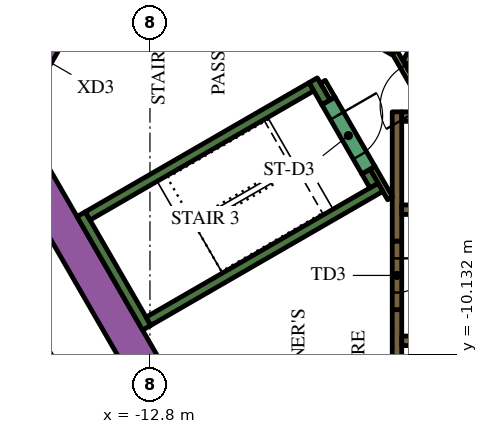
"""IFC4 building model, lengths in metres.
Left out: names, types, materials, properties, quantities, classifications, styles, units other than length and angle.
Written with IfcOpenShell. Run it as: python <this file> out.ifc"""

import sys

from ifc_helpers import new_model, si_unit, direction, frame, frame_2d, origin, place, context, subcontext, project, spatial, rectangle, extrude, element, fill, save


model = new_model("IFC4")
c1 = context("Model", 3, precision=1e-05, world=origin(), true_north=direction((0.0, 1.0)))
c2 = subcontext(c1, "Body", "Model", "MODEL_VIEW")
j1 = project(units=[si_unit("LENGTHUNIT", "METRE"), si_unit("PLANEANGLEUNIT", "RADIAN")], contexts=[c1])
p1 = place(None, origin())
s1 = spatial("IfcSite", under=j1, at=p1, CompositionType="ELEMENT")
p2 = place(p1, origin())
s2 = spatial("IfcBuilding", under=s1, at=p2, CompositionType="ELEMENT")
p3 = place(p2, frame((0.0, 0.0, 47.1)))
s3 = spatial("IfcBuildingStorey", under=s2, at=p3, CompositionType="ELEMENT", Elevation=47.1)
p4 = place(p3, frame((-12.134, -11.883, 0.0), z_axis=(0.0, 0.0, 1.0), x_axis=(-0.500005339912, 0.866022320763, 0.0)))
e1 = element("IfcWall", 1, at=p4, inside=s3, PredefinedType="SOLIDWALL", context=c2, shape_type="SweptSolid", body=[
    extrude(rectangle(XDim=9.488, YDim=0.9, at=frame_2d((4.744, 0.0))), origin(), (0.0, 0.0, 1.0), 3.9),
])
p5 = place(p3, frame((-12.885, -9.431, 0.0), z_axis=(0.0, 0.0, 1.0), x_axis=(-0.500020560727, 0.866013532718, 0.0)))
e2 = element("IfcWall", 2, at=p5, inside=s3, PredefinedType="SOLIDWALL", context=c2, shape_type="SweptSolid", body=[
    extrude(rectangle(XDim=3.45, YDim=0.25, at=frame_2d((1.725, 0.0))), origin(), (0.0, 0.0, 1.0), 3.9),
])
p6 = place(p3, frame((-14.44, -6.49, 0.0), z_axis=(0.0, 0.0, 1.0), x_axis=(0.866022966069, 0.500004222222, 0.0)))
e3 = element("IfcWall", 3, at=p6, inside=s3, PredefinedType="SOLIDWALL", context=c2, shape_type="SweptSolid", body=[
    extrude(rectangle(XDim=6.8, YDim=0.25, at=frame_2d((3.4, 0.0))), origin(), (0.0, 0.0, 1.0), 3.9),
])
p7 = place(p3, frame((-8.168, -3.503, 0.0), z_axis=(0.0, 0.0, 1.0), x_axis=(-0.499952099219, 0.866053057547, 0.0)))
e4 = element("IfcWall", 4, at=p7, inside=s3, PredefinedType="SOLIDWALL", context=c2, shape_type="SweptSolid", body=[
    extrude(rectangle(XDim=0.675, YDim=0.25, at=frame_2d((0.337, 0.0))), origin(), (0.0, 0.0, 1.0), 3.9),
])
p8 = place(p3, frame((-12.84, -9.261, 0.0), z_axis=(0.0, 0.0, 1.0), x_axis=(0.866016039709, 0.500016218704, 0.0)))
e5 = element("IfcWall", 5, at=p8, inside=s3, PredefinedType="SOLIDWALL", context=c2, shape_type="SweptSolid", body=[
    extrude(rectangle(XDim=7.05, YDim=0.25, at=frame_2d((3.525, 0.0))), origin(), (0.0, 0.0, 1.0), 3.9),
])
p9 = place(p3, frame((-6.905, -5.69, 0.0), z_axis=(0.0, 0.0, 1.0), x_axis=(-0.500402024738, 0.865793170242, 0.0)))
e6 = element("IfcWall", 6, at=p9, inside=s3, PredefinedType="SOLIDWALL", context=c2, shape_type="SweptSolid", body=[
    extrude(rectangle(XDim=0.425, YDim=0.25, at=frame_2d((0.212, 0.0))), origin(), (0.0, 0.0, 1.0), 3.9),
])
p10 = place(p3, frame((-6.3, -12.1, 0.0), z_axis=(0.0, 0.0, 1.0), x_axis=(0.0, 1.0, 0.0)))
e7 = element("IfcWall", 7, at=p10, inside=s3, PredefinedType="SOLIDWALL", context=c2, shape_type="SweptSolid", body=[
    extrude(rectangle(XDim=3.146, YDim=0.25, at=frame_2d((1.573, 0.0))), origin(), (0.0, 0.0, 1.0), 3.9),
])
p11 = place(p3, frame((-6.3, -3.75, 0.0), z_axis=(0.0, 0.0, 1.0), x_axis=(0.0, -1.0, 0.0)))
e8 = element("IfcWall", 8, at=p11, inside=s3, PredefinedType="SOLIDWALL", context=c2, shape_type="SweptSolid", body=[
    extrude(rectangle(XDim=3.404, YDim=0.25, at=frame_2d((1.702, 0.0))), origin(), (0.0, 0.0, 1.0), 3.9),
])
p12 = place(p3, frame((-6.175, -3.875, 0.0), z_axis=(0.0, 0.0, 1.0), x_axis=(1.0, 0.0, 0.0)))
e9 = element("IfcWall", 9, at=p12, inside=s3, PredefinedType="SOLIDWALL", context=c2, shape_type="SweptSolid", body=[
    extrude(rectangle(XDim=0.637, YDim=0.25, at=frame_2d((0.318, 0.0))), origin(), (0.0, 0.0, 1.0), 3.9),
])
p13 = place(p3, frame((-6.088, -2.305, 0.0), z_axis=(0.0, 0.0, 1.0), x_axis=(0.866059450854, -0.499941024108, 0.0)))
e10 = element("IfcWall", 10, at=p13, inside=s3, PredefinedType="SOLIDWALL", context=c2, shape_type="SweptSolid", body=[
    extrude(rectangle(XDim=0.29, YDim=0.25, at=frame_2d((0.145, 0.0))), origin(), (0.0, 0.0, 1.0), 3.9),
])
p14 = place(p3, frame((-7.889, -1.265, 0.0), z_axis=(0.0, 0.0, 1.0), x_axis=(0.865986741702, -0.500066958712, 0.0)))
e11 = element("IfcWall", 11, at=p14, inside=s3, PredefinedType="SOLIDWALL", context=c2, shape_type="SweptSolid", body=[
    extrude(rectangle(XDim=1.738, YDim=0.25, at=frame_2d((0.869, 0.0))), origin(), (0.0, 0.0, 1.0), 3.9),
])
p15 = place(p3, frame((-6.48, -6.027, 0.0), z_axis=(0.0, 0.0, 1.0), x_axis=(-0.499927229454, 0.866067413802, 0.0)))
e12 = element("IfcWall", 12, at=p15, inside=s3, PredefinedType="PARTITIONING", context=c2, shape_type="SweptSolid", body=[
    extrude(rectangle(XDim=0.929, YDim=0.15, at=frame_2d((0.464, 0.0))), origin(), (0.0, 0.0, 1.0), 3.9),
])
p16 = place(p3, frame((-8.252, -2.958, 0.0), z_axis=(0.0, 0.0, 1.0), x_axis=(0.500174715838, -0.865924508047, 0.0)))
e13 = element("IfcWall", 13, at=p16, inside=s3, PredefinedType="PARTITIONING", context=c2, shape_type="SweptSolid", body=[
    extrude(rectangle(XDim=0.514, YDim=0.15, at=frame_2d((0.257, 0.0))), origin(), (0.0, 0.0, 1.0), 2.75),
])
p17 = place(p3, frame((-6.175, -9.775, 0.0), z_axis=(0.0, 0.0, 1.0), x_axis=(1.0, 0.0, 0.0)))
e14 = element("IfcWall", 14, at=p17, inside=s3, PredefinedType="SOLIDWALL", context=c2, shape_type="SweptSolid", body=[
    extrude(rectangle(XDim=12.35, YDim=0.25, at=frame_2d((6.175, 0.0))), origin(), (0.0, 0.0, 1.0), 3.9),
])
p18 = place(p17, frame((0.585, 0.0, 0.0)))
e15 = element("IfcOpeningElement", 15, at=p18, cuts=e14, PredefinedType="OPENING", context=c2, shape_type="SweptSolid", body=[
    extrude(rectangle(XDim=1.1, YDim=2.1, at=frame_2d((0.55, 1.05))), frame((0.0, 0.135, 0.0), z_axis=(0.0, -1.0, 0.0), x_axis=(1.0, 0.0, 0.0)), (0.0, 0.0, 1.0), 0.27),
])
p19 = place(p17, frame((3.105, 0.0, 0.0)))
e16 = element("IfcOpeningElement", 16, at=p19, cuts=e14, PredefinedType="OPENING", context=c2, shape_type="SweptSolid", body=[
    extrude(rectangle(XDim=1.1, YDim=2.1, at=frame_2d((0.55, 1.05))), frame((0.0, 0.135, 0.0), z_axis=(0.0, -1.0, 0.0), x_axis=(1.0, 0.0, 0.0)), (0.0, 0.0, 1.0), 0.27),
])
p20 = place(p17, frame((5.625, 0.0, 0.0)))
e17 = element("IfcOpeningElement", 17, at=p20, cuts=e14, PredefinedType="OPENING", context=c2, shape_type="SweptSolid", body=[
    extrude(rectangle(XDim=1.1, YDim=2.1, at=frame_2d((0.55, 1.05))), frame((0.0, 0.135, 0.0), z_axis=(0.0, -1.0, 0.0), x_axis=(1.0, 0.0, 0.0)), (0.0, 0.0, 1.0), 0.27),
])
p21 = place(p17, frame((8.145, 0.0, 0.0)))
e18 = element("IfcOpeningElement", 18, at=p21, cuts=e14, PredefinedType="OPENING", context=c2, shape_type="SweptSolid", body=[
    extrude(rectangle(XDim=1.1, YDim=2.1, at=frame_2d((0.55, 1.05))), frame((0.0, 0.135, 0.0), z_axis=(0.0, -1.0, 0.0), x_axis=(1.0, 0.0, 0.0)), (0.0, 0.0, 1.0), 0.27),
])
p22 = place(p17, frame((10.665, 0.0, 0.0)))
e19 = element("IfcOpeningElement", 19, at=p22, cuts=e14, PredefinedType="OPENING", context=c2, shape_type="SweptSolid", body=[
    extrude(rectangle(XDim=1.1, YDim=2.1, at=frame_2d((0.55, 1.05))), frame((0.0, 0.135, 0.0), z_axis=(0.0, -1.0, 0.0), x_axis=(1.0, 0.0, 0.0)), (0.0, 0.0, 1.0), 0.27),
])
p23 = place(p3, frame((-6.175, -6.325, 0.0), z_axis=(0.0, 0.0, 1.0), x_axis=(1.0, 0.0, 0.0)))
e20 = element("IfcWall", 20, at=p23, inside=s3, PredefinedType="SOLIDWALL", context=c2, shape_type="SweptSolid", body=[
    extrude(rectangle(XDim=12.35, YDim=0.25, at=frame_2d((6.175, 0.0))), origin(), (0.0, 0.0, 1.0), 3.9),
])
p24 = place(p23, frame((3.205, 0.0, 0.0)))
e21 = element("IfcOpeningElement", 21, at=p24, cuts=e20, PredefinedType="OPENING", context=c2, shape_type="SweptSolid", body=[
    extrude(rectangle(XDim=0.9, YDim=2.1, at=frame_2d((0.45, 1.05))), frame((0.0, 0.135, 0.0), z_axis=(0.0, -1.0, 0.0), x_axis=(1.0, 0.0, 0.0)), (0.0, 0.0, 1.0), 0.27),
])
p25 = place(p23, frame((8.145, 0.0, 0.0)))
e22 = element("IfcOpeningElement", 22, at=p25, cuts=e20, PredefinedType="OPENING", context=c2, shape_type="SweptSolid", body=[
    extrude(rectangle(XDim=1.1, YDim=2.1, at=frame_2d((0.55, 1.05))), frame((0.0, 0.135, 0.0), z_axis=(0.0, -1.0, 0.0), x_axis=(1.0, 0.0, 0.0)), (0.0, 0.0, 1.0), 0.27),
])
p26 = place(p23, frame((10.665, 0.0, 0.0)))
e23 = element("IfcOpeningElement", 23, at=p26, cuts=e20, PredefinedType="OPENING", context=c2, shape_type="SweptSolid", body=[
    extrude(rectangle(XDim=1.1, YDim=2.1, at=frame_2d((0.55, 1.05))), frame((0.0, 0.135, 0.0), z_axis=(0.0, -1.0, 0.0), x_axis=(1.0, 0.0, 0.0)), (0.0, 0.0, 1.0), 0.27),
])
p27 = place(p3, frame((-8.103, -3.466, 0.0), z_axis=(0.0, 0.0, 1.0), x_axis=(0.500078061341, -0.865980330357, 0.0)))
e24 = element("IfcWall", 24, at=p27, inside=s3, PredefinedType="SOLIDWALL", context=c2, shape_type="SweptSolid", body=[
    extrude(rectangle(XDim=2.1, YDim=0.4, at=frame_2d((1.05, 0.0))), origin(), (0.0, 0.0, 1.0), 3.9),
])
p28 = place(p27, frame((0.45, 0.0, 0.0)))
e25 = element("IfcOpeningElement", 25, at=p28, cuts=e24, PredefinedType="OPENING", context=c2, shape_type="SweptSolid", body=[
    extrude(rectangle(XDim=1.2, YDim=2.1, at=frame_2d((0.6, 1.05))), frame((0.0, 0.21, 0.0), z_axis=(0.0, -1.0, 0.0), x_axis=(1.0, 0.0, 0.0)), (0.0, 0.0, 1.0), 0.42),
])
p29 = place(p3, frame((-6.3, -7.154, 0.0), z_axis=(0.0, 0.0, 1.0), x_axis=(0.0, -1.0, 0.0)))
e26 = element("IfcWall", 26, at=p29, inside=s3, PredefinedType="SOLIDWALL", context=c2, shape_type="SweptSolid", body=[
    extrude(rectangle(XDim=1.8, YDim=0.25, at=frame_2d((0.9, 0.0))), origin(), (0.0, 0.0, 1.0), 3.9),
])
p30 = place(p29, frame((0.45, 0.0, 0.0)))
e27 = element("IfcOpeningElement", 27, at=p30, cuts=e26, PredefinedType="OPENING", context=c2, shape_type="SweptSolid", body=[
    extrude(rectangle(XDim=0.9, YDim=2.1, at=frame_2d((0.45, 1.05))), frame((0.0, 0.135, 0.0), z_axis=(0.0, -1.0, 0.0), x_axis=(1.0, 0.0, 0.0)), (0.0, 0.0, 1.0), 0.27),
])
p31 = place(p3, frame((-5.317, -3.99, 0.0), z_axis=(0.0, 0.0, 1.0), x_axis=(-0.500027713859, 0.866009402589, 0.0)))
e28 = element("IfcWall", 28, at=p31, inside=s3, PredefinedType="PARTITIONING", context=c2, shape_type="SweptSolid", body=[
    extrude(rectangle(XDim=2.1, YDim=0.15, at=frame_2d((1.05, 0.0))), origin(), (0.0, 0.0, 1.0), 3.9),
])
p32 = place(p31, frame((0.45, 0.0, 0.0)))
e29 = element("IfcOpeningElement", 29, at=p32, cuts=e28, PredefinedType="OPENING", context=c2, shape_type="SweptSolid", body=[
    extrude(rectangle(XDim=1.2, YDim=2.1, at=frame_2d((0.6, 1.05))), frame((0.0, 0.085, 0.0), z_axis=(0.0, -1.0, 0.0), x_axis=(1.0, 0.0, 0.0)), (0.0, 0.0, 1.0), 0.17),
])
p33 = place(p3, frame((-16.209, -2.976, 0.0), z_axis=(0.0, 0.0, 1.0), x_axis=(0.499954529098, 0.86605165483, 0.0)))
e30 = element("IfcWall", 30, at=p33, inside=s3, PredefinedType="SOLIDWALL", context=c2, shape_type="SweptSolid", body=[
    extrude(rectangle(XDim=1.7, YDim=0.9, at=frame_2d((0.85, 0.0))), origin(), (0.0, 0.0, 1.0), 3.9),
])
p34 = place(p33, frame((0.25, 0.0, 0.0)))
e31 = element("IfcOpeningElement", 31, at=p34, cuts=e30, PredefinedType="OPENING", context=c2, shape_type="SweptSolid", body=[
    extrude(rectangle(XDim=1.2, YDim=2.1, at=frame_2d((0.6, 1.05))), frame((0.0, 0.46, 0.0), z_axis=(0.0, -1.0, 0.0), x_axis=(1.0, 0.0, 0.0)), (0.0, 0.0, 1.0), 0.92),
])
p35 = place(p3, frame((-19.081, -3.9, 0.0), z_axis=(0.0, 0.0, 1.0), x_axis=(0.499998313975, 0.866026377209, 0.0)))
e32 = element("IfcWall", 32, at=p35, inside=s3, PredefinedType="PARTITIONING", context=c2, shape_type="SweptSolid", body=[
    extrude(rectangle(XDim=25.766, YDim=0.15, at=frame_2d((12.883, 0.0))), origin(), (0.0, 0.0, 1.0), 2.75),
])
p36 = place(p35, frame((16.196, 0.0, 0.0)))
e33 = element("IfcOpeningElement", 33, at=p36, cuts=e32, PredefinedType="OPENING", context=c2, shape_type="SweptSolid", body=[
    extrude(rectangle(XDim=1.0, YDim=2.1, at=frame_2d((0.5, 1.05))), frame((0.0, 0.085, 0.0), z_axis=(0.0, -1.0, 0.0), x_axis=(1.0, 0.0, 0.0)), (0.0, 0.0, 1.0), 0.17),
])
p37 = place(p35, frame((14.889, 0.0, 0.0)))
e34 = element("IfcOpeningElement", 34, at=p37, cuts=e32, PredefinedType="OPENING", context=c2, shape_type="SweptSolid", body=[
    extrude(rectangle(XDim=1.0, YDim=2.1, at=frame_2d((0.5, 1.05))), frame((0.0, 0.085, 0.0), z_axis=(0.0, -1.0, 0.0), x_axis=(1.0, 0.0, 0.0)), (0.0, 0.0, 1.0), 0.17),
])
p38 = place(p35, frame((3.698, 0.0, 0.0)))
e35 = element("IfcOpeningElement", 35, at=p38, cuts=e32, PredefinedType="OPENING", context=c2, shape_type="SweptSolid", body=[
    extrude(rectangle(XDim=1.1, YDim=2.1, at=frame_2d((0.55, 1.05))), frame((0.0, 0.085, 0.0), z_axis=(0.0, -1.0, 0.0), x_axis=(1.0, 0.0, 0.0)), (0.0, 0.0, 1.0), 0.17),
])
p39 = place(p35, frame((2.392, 0.0, 0.0)))
e36 = element("IfcOpeningElement", 36, at=p39, cuts=e32, PredefinedType="OPENING", context=c2, shape_type="SweptSolid", body=[
    extrude(rectangle(XDim=1.0, YDim=2.1, at=frame_2d((0.5, 1.05))), frame((0.0, 0.085, 0.0), z_axis=(0.0, -1.0, 0.0), x_axis=(1.0, 0.0, 0.0)), (0.0, 0.0, 1.0), 0.17),
])
p40 = place(p3, frame((-12.918, -14.575, 0.0), z_axis=(0.0, 0.0, 1.0), x_axis=(-0.500009150678, 0.866020120573, 0.0)))
e37 = element("IfcWall", 37, at=p40, inside=s3, PredefinedType="PARTITIONING", context=c2, shape_type="SweptSolid", body=[
    extrude(rectangle(XDim=5.258, YDim=0.15, at=frame_2d((2.629, 0.0))), origin(), (0.0, 0.0, 1.0), 2.75),
])
p41 = place(p40, frame((1.888, 0.0, 0.0)))
e38 = element("IfcOpeningElement", 38, at=p41, cuts=e37, PredefinedType="OPENING", context=c2, shape_type="SweptSolid", body=[
    extrude(rectangle(XDim=1.0, YDim=2.1, at=frame_2d((0.5, 1.05))), frame((0.0, 0.085, 0.0), z_axis=(0.0, -1.0, 0.0), x_axis=(1.0, 0.0, 0.0)), (0.0, 0.0, 1.0), 0.17),
])
p42 = place(p28, origin())
e39 = element("IfcDoor", 39, at=p42, inside=s3, OperationType="SINGLE_SWING_LEFT", PredefinedType="DOOR", context=c2, shape_type="SweptSolid", body=[
    extrude(rectangle(XDim=1.2, YDim=2.1, at=frame_2d((0.6, 1.05))), frame((0.0, 0.025, 0.0), z_axis=(0.0, -1.0, 0.0), x_axis=(1.0, 0.0, 0.0)), (0.0, 0.0, 1.0), 0.05),
])
fill(e25, e39)
p43 = place(p30, origin())
e40 = element("IfcDoor", 40, at=p43, inside=s3, OperationType="SINGLE_SWING_LEFT", PredefinedType="DOOR", context=c2, shape_type="SweptSolid", body=[
    extrude(rectangle(XDim=0.9, YDim=2.1, at=frame_2d((0.45, 1.05))), frame((0.0, 0.025, 0.0), z_axis=(0.0, -1.0, 0.0), x_axis=(1.0, 0.0, 0.0)), (0.0, 0.0, 1.0), 0.05),
])
fill(e27, e40)
p44 = place(p32, origin())
e41 = element("IfcDoor", 41, at=p44, inside=s3, OperationType="SINGLE_SWING_LEFT", PredefinedType="DOOR", context=c2, shape_type="SweptSolid", body=[
    extrude(rectangle(XDim=1.2, YDim=2.1, at=frame_2d((0.6, 1.05))), frame((0.0, 0.025, 0.0), z_axis=(0.0, -1.0, 0.0), x_axis=(1.0, 0.0, 0.0)), (0.0, 0.0, 1.0), 0.05),
])
fill(e29, e41)
save(model, sys.argv[1])
